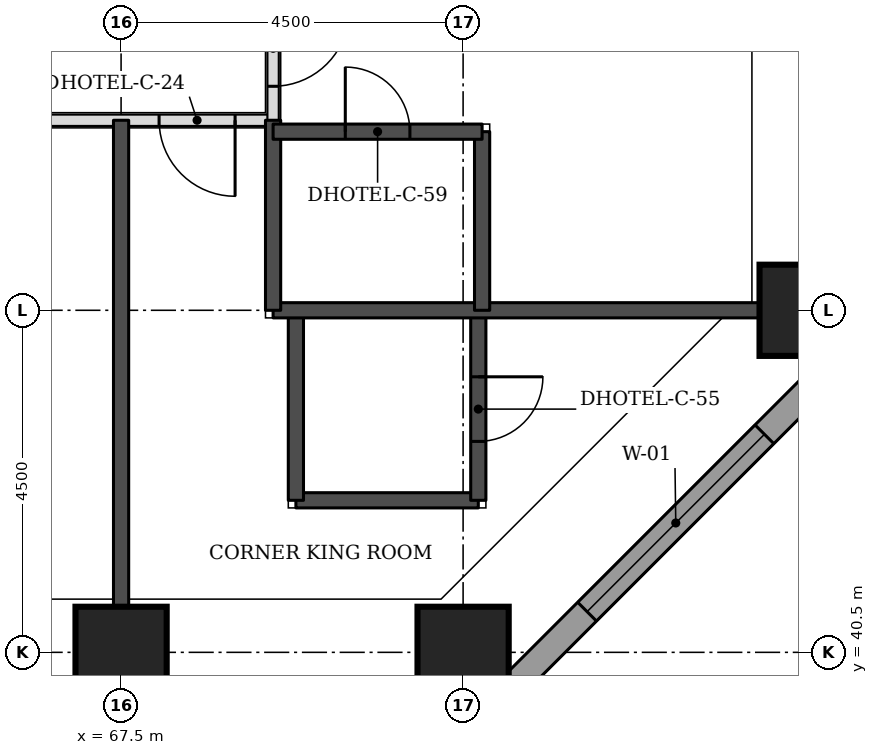
"""IFC4 building model, lengths in metres.
Left out: names, types, materials, properties, quantities, classifications, styles, units other than length and angle.
Written with IfcOpenShell. Run it as: python <this file> out.ifc"""

import sys

from ifc_helpers import new_model, si_unit, direction, frame, frame_2d, origin, origin_2d, place, context, subcontext, project, spatial, rectangle, extrude, element, fill, save


model = new_model("IFC4")
c1 = context("Model", 3, precision=1e-05, world=origin(), true_north=direction((0.0, 1.0)))
c2 = subcontext(c1, "Body", "Model", "MODEL_VIEW")
j1 = project(units=[si_unit("LENGTHUNIT", "METRE"), si_unit("PLANEANGLEUNIT", "RADIAN")], contexts=[c1])
p1 = place(None, origin())
s1 = spatial("IfcSite", under=j1, at=p1, CompositionType="ELEMENT")
p2 = place(p1, origin())
s2 = spatial("IfcBuilding", under=s1, at=p2, CompositionType="ELEMENT")
p3 = place(p2, frame((0.0, 0.0, 56.1)))
s3 = spatial("IfcBuildingStorey", under=s2, at=p3, CompositionType="ELEMENT", Elevation=56.1)
for number, where, z_axis, x_axis in (
    (1, (67.5, 40.5, 0.0), (0.0, 0.0, 1.0), (1.0, 0.0, 0.0)),
    (2, (72.0, 40.5, 0.0), (0.0, 0.0, 1.0), (1.0, 0.0, 0.0)),
    (3, (76.5, 45.0, 0.0), (0.0, 0.0, 1.0), (1.0, 0.0, 0.0)),
):
    element("IfcColumn", number, at=place(p3, frame(where, z_axis=z_axis, x_axis=x_axis)), inside=s3, PredefinedType="COLUMN", context=c2, shape_type="SweptSolid", body=[
        extrude(rectangle(XDim=1.2, YDim=1.2, at=origin_2d()), origin(), (0.0, 0.0, 1.0), 3.3),
    ])
p4 = place(p3, frame((72.27, 39.674, 0.0), z_axis=(0.0, 0.0, 1.0), x_axis=(0.707106781187, 0.707106781187, 0.0)))
e4 = element("IfcWall", 4, at=p4, inside=s3, PredefinedType="STANDARD", context=c2, shape_type="SweptSolid", body=[
    extrude(rectangle(XDim=7.151, YDim=0.35, at=frame_2d((3.576, 0.0))), origin(), (0.0, 0.0, 1.0), 3.055),
])
p5 = place(p4, frame((1.926, 0.0, 0.8)))
e5 = element("IfcOpeningElement", 5, at=p5, cuts=e4, PredefinedType="OPENING", context=c2, shape_type="SweptSolid", body=[
    extrude(rectangle(XDim=3.3, YDim=1.5, at=frame_2d((1.65, 0.75))), frame((0.0, 0.185, 0.0), z_axis=(0.0, -1.0, 0.0), x_axis=(1.0, 0.0, 0.0)), (0.0, 0.0, 1.0), 0.37),
])
p6 = place(p3, frame((52.85, 47.5, 0.0), z_axis=(0.0, 0.0, 1.0), x_axis=(1.0, 0.0, 0.0)))
e6 = element("IfcWall", 6, at=p6, inside=s3, PredefinedType="PARTITIONING", context=c2, shape_type="SweptSolid", body=[
    extrude(rectangle(XDim=16.65, YDim=0.15, at=frame_2d((8.325, 0.0))), origin(), (0.0, 0.0, 1.0), 3.08),
])
p7 = place(p6, frame((11.3, 0.0, 0.0)))
e7 = element("IfcOpeningElement", 7, at=p7, cuts=e6, PredefinedType="OPENING", context=c2, shape_type="SweptSolid", body=[
    extrude(rectangle(XDim=1.1, YDim=2.1, at=frame_2d((0.55, 1.05))), frame((0.0, 0.085, 0.0), z_axis=(0.0, -1.0, 0.0), x_axis=(1.0, 0.0, 0.0)), (0.0, 0.0, 1.0), 0.17),
])
p8 = place(p6, frame((15.15, 0.0, 0.0)))
e8 = element("IfcOpeningElement", 8, at=p8, cuts=e6, PredefinedType="OPENING", context=c2, shape_type="SweptSolid", body=[
    extrude(rectangle(XDim=1.0, YDim=2.1, at=frame_2d((0.5, 1.05))), frame((0.0, 0.085, 0.0), z_axis=(0.0, -1.0, 0.0), x_axis=(1.0, 0.0, 0.0)), (0.0, 0.0, 1.0), 0.17),
])
p9 = place(p3, frame((69.5, 47.5, 0.0), z_axis=(0.0, 0.0, 1.0), x_axis=(0.0, 1.0, 0.0)))
e9 = element("IfcWall", 9, at=p9, inside=s3, PredefinedType="PARTITIONING", context=c2, shape_type="SweptSolid", body=[
    extrude(rectangle(XDim=26.5, YDim=0.15, at=frame_2d((13.25, 0.0))), origin(), (0.0, 0.0, 1.0), 3.08),
])
p10 = place(p9, frame((25.053, 0.0, 0.0)))
e10 = element("IfcOpeningElement", 10, at=p10, cuts=e9, PredefinedType="OPENING", context=c2, shape_type="SweptSolid", body=[
    extrude(rectangle(XDim=1.0, YDim=2.1, at=frame_2d((0.5, 1.05))), frame((0.0, 0.085, 0.0), z_axis=(0.0, -1.0, 0.0), x_axis=(1.0, 0.0, 0.0)), (0.0, 0.0, 1.0), 0.17),
])
p11 = place(p9, frame((18.275, 0.0, 0.0)))
e11 = element("IfcOpeningElement", 11, at=p11, cuts=e9, PredefinedType="OPENING", context=c2, shape_type="SweptSolid", body=[
    extrude(rectangle(XDim=1.0, YDim=2.1, at=frame_2d((0.5, 1.05))), frame((0.0, 0.085, 0.0), z_axis=(0.0, -1.0, 0.0), x_axis=(1.0, 0.0, 0.0)), (0.0, 0.0, 1.0), 0.17),
])
p12 = place(p9, frame((12.15, 0.0, 0.0)))
e12 = element("IfcOpeningElement", 12, at=p12, cuts=e9, PredefinedType="OPENING", context=c2, shape_type="SweptSolid", body=[
    extrude(rectangle(XDim=1.1, YDim=2.1, at=frame_2d((0.55, 1.05))), frame((0.0, 0.085, 0.0), z_axis=(0.0, -1.0, 0.0), x_axis=(1.0, 0.0, 0.0)), (0.0, 0.0, 1.0), 0.17),
])
p13 = place(p9, frame((2.825, 0.0, 0.0)))
e13 = element("IfcOpeningElement", 13, at=p13, cuts=e9, PredefinedType="OPENING", context=c2, shape_type="SweptSolid", body=[
    extrude(rectangle(XDim=1.0, YDim=2.1, at=frame_2d((0.5, 1.05))), frame((0.0, 0.085, 0.0), z_axis=(0.0, -1.0, 0.0), x_axis=(1.0, 0.0, 0.0)), (0.0, 0.0, 1.0), 0.17),
])
p14 = place(p9, frame((0.447, 0.0, 0.0)))
e14 = element("IfcOpeningElement", 14, at=p14, cuts=e9, PredefinedType="OPENING", context=c2, shape_type="SweptSolid", body=[
    extrude(rectangle(XDim=1.0, YDim=2.1, at=frame_2d((0.5, 1.05))), frame((0.0, 0.085, 0.0), z_axis=(0.0, -1.0, 0.0), x_axis=(1.0, 0.0, 0.0)), (0.0, 0.0, 1.0), 0.17),
])
p15 = place(p3, frame((67.5, 41.1, 0.0), z_axis=(0.0, 0.0, 1.0), x_axis=(0.0, 1.0, 0.0)))
e15 = element("IfcWall", 15, at=p15, inside=s3, PredefinedType="SOLIDWALL", context=c2, shape_type="SweptSolid", body=[
    extrude(rectangle(XDim=6.4, YDim=0.2, at=frame_2d((3.2, 0.0))), origin(), (0.0, 0.0, 1.0), 3.08),
])
p16 = place(p3, frame((69.8, 42.5, 0.0), z_axis=(0.0, 0.0, 1.0), x_axis=(1.0, 0.0, 0.0)))
e16 = element("IfcWall", 16, at=p16, inside=s3, PredefinedType="SOLIDWALL", context=c2, shape_type="SweptSolid", body=[
    extrude(rectangle(XDim=2.4, YDim=0.2, at=frame_2d((1.2, 0.0))), origin(), (0.0, 0.0, 1.0), 3.08),
])
p17 = place(p3, frame((69.8, 42.5, 0.0), z_axis=(0.0, 0.0, 1.0), x_axis=(0.0, 1.0, 0.0)))
e17 = element("IfcWall", 17, at=p17, inside=s3, PredefinedType="SOLIDWALL", context=c2, shape_type="SweptSolid", body=[
    extrude(rectangle(XDim=2.5, YDim=0.2, at=frame_2d((1.25, 0.0))), origin(), (0.0, 0.0, 1.0), 3.08),
])
p18 = place(p3, frame((72.2, 42.5, 0.0), z_axis=(0.0, 0.0, 1.0), x_axis=(0.0, 1.0, 0.0)))
e18 = element("IfcWall", 18, at=p18, inside=s3, PredefinedType="SOLIDWALL", context=c2, shape_type="SweptSolid", body=[
    extrude(rectangle(XDim=2.5, YDim=0.2, at=frame_2d((1.25, 0.0))), origin(), (0.0, 0.0, 1.0), 3.08),
])
p19 = place(p18, frame((0.775, 0.0, 0.0)))
e19 = element("IfcOpeningElement", 19, at=p19, cuts=e18, PredefinedType="OPENING", context=c2, shape_type="SweptSolid", body=[
    extrude(rectangle(XDim=0.85, YDim=2.1, at=frame_2d((0.425, 1.05))), frame((0.0, 0.11, 0.0), z_axis=(0.0, -1.0, 0.0), x_axis=(1.0, 0.0, 0.0)), (0.0, 0.0, 1.0), 0.22),
])
p20 = place(p3, frame((69.5, 45.0, 0.0), z_axis=(0.0, 0.0, 1.0), x_axis=(1.0, 0.0, 0.0)))
e20 = element("IfcWall", 20, at=p20, inside=s3, PredefinedType="SOLIDWALL", context=c2, shape_type="SweptSolid", body=[
    extrude(rectangle(XDim=6.4, YDim=0.2, at=frame_2d((3.2, 0.0))), origin(), (0.0, 0.0, 1.0), 3.08),
])
p21 = place(p3, frame((69.5, 45.0, 0.0), z_axis=(0.0, 0.0, 1.0), x_axis=(0.0, 1.0, 0.0)))
e21 = element("IfcWall", 21, at=p21, inside=s3, PredefinedType="SOLIDWALL", context=c2, shape_type="SweptSolid", body=[
    extrude(rectangle(XDim=2.5, YDim=0.2, at=frame_2d((1.25, 0.0))), origin(), (0.0, 0.0, 1.0), 3.08),
])
p22 = place(p3, frame((72.25, 45.0, 0.0), z_axis=(0.0, 0.0, 1.0), x_axis=(0.0, 1.0, 0.0)))
e22 = element("IfcWall", 22, at=p22, inside=s3, PredefinedType="SOLIDWALL", context=c2, shape_type="SweptSolid", body=[
    extrude(rectangle(XDim=2.35, YDim=0.2, at=frame_2d((1.175, 0.0))), origin(), (0.0, 0.0, 1.0), 3.08),
])
p23 = place(p3, frame((69.5, 47.35, 0.0), z_axis=(0.0, 0.0, 1.0), x_axis=(1.0, 0.0, 0.0)))
e23 = element("IfcWall", 23, at=p23, inside=s3, PredefinedType="SOLIDWALL", context=c2, shape_type="SweptSolid", body=[
    extrude(rectangle(XDim=2.75, YDim=0.2, at=frame_2d((1.375, 0.0))), origin(), (0.0, 0.0, 1.0), 3.08),
])
p24 = place(p23, frame((0.95, 0.0, 0.0)))
e24 = element("IfcOpeningElement", 24, at=p24, cuts=e23, PredefinedType="OPENING", context=c2, shape_type="SweptSolid", body=[
    extrude(rectangle(XDim=0.85, YDim=2.1, at=frame_2d((0.425, 1.05))), frame((0.0, 0.11, 0.0), z_axis=(0.0, -1.0, 0.0), x_axis=(1.0, 0.0, 0.0)), (0.0, 0.0, 1.0), 0.22),
])
p25 = place(p5, origin())
e25 = element("IfcWindow", 25, at=p25, inside=s3, PartitioningType="SINGLE_PANEL", PredefinedType="WINDOW", context=c2, shape_type="SweptSolid", body=[
    extrude(rectangle(XDim=3.3, YDim=1.5, at=frame_2d((1.65, 0.75))), frame((0.0, 0.085, 0.0), z_axis=(0.0, -1.0, 0.0), x_axis=(1.0, 0.0, 0.0)), (0.0, 0.0, 1.0), 0.06),
])
fill(e5, e25)
p26 = place(p14, frame((1.0, 0.0, 0.0), z_axis=(0.0, 0.0, 1.0), x_axis=(-1.0, 0.0, 0.0)))
e26 = element("IfcDoor", 26, at=p26, inside=s3, OperationType="SINGLE_SWING_LEFT", PredefinedType="DOOR", context=c2, shape_type="SweptSolid", body=[
    extrude(rectangle(XDim=1.0, YDim=2.1, at=frame_2d((0.5, 1.05))), frame((0.0, 0.025, 0.0), z_axis=(0.0, -1.0, 0.0), x_axis=(1.0, 0.0, 0.0)), (0.0, 0.0, 1.0), 0.05),
])
fill(e14, e26)
p27 = place(p24, origin())
e27 = element("IfcDoor", 27, at=p27, inside=s3, OperationType="SINGLE_SWING_LEFT", PredefinedType="DOOR", context=c2, shape_type="SweptSolid", body=[
    extrude(rectangle(XDim=0.85, YDim=2.1, at=frame_2d((0.425, 1.05))), frame((0.0, 0.025, 0.0), z_axis=(0.0, -1.0, 0.0), x_axis=(1.0, 0.0, 0.0)), (0.0, 0.0, 1.0), 0.05),
])
fill(e24, e27)
p28 = place(p8, frame((1.0, 0.0, 0.0), z_axis=(0.0, 0.0, 1.0), x_axis=(-1.0, 0.0, 0.0)))
e28 = element("IfcDoor", 28, at=p28, inside=s3, OperationType="SINGLE_SWING_LEFT", PredefinedType="DOOR", context=c2, shape_type="SweptSolid", body=[
    extrude(rectangle(XDim=1.0, YDim=2.1, at=frame_2d((0.5, 1.05))), frame((0.0, 0.025, 0.0), z_axis=(0.0, -1.0, 0.0), x_axis=(1.0, 0.0, 0.0)), (0.0, 0.0, 1.0), 0.05),
])
fill(e8, e28)
p29 = place(p19, frame((0.85, 0.0, 0.0), z_axis=(0.0, 0.0, 1.0), x_axis=(-1.0, 0.0, 0.0)))
e29 = element("IfcDoor", 29, at=p29, inside=s3, OperationType="SINGLE_SWING_LEFT", PredefinedType="DOOR", context=c2, shape_type="SweptSolid", body=[
    extrude(rectangle(XDim=0.85, YDim=2.1, at=frame_2d((0.425, 1.05))), frame((0.0, 0.025, 0.0), z_axis=(0.0, -1.0, 0.0), x_axis=(1.0, 0.0, 0.0)), (0.0, 0.0, 1.0), 0.05),
])
fill(e19, e29)
save(model, sys.argv[1])
